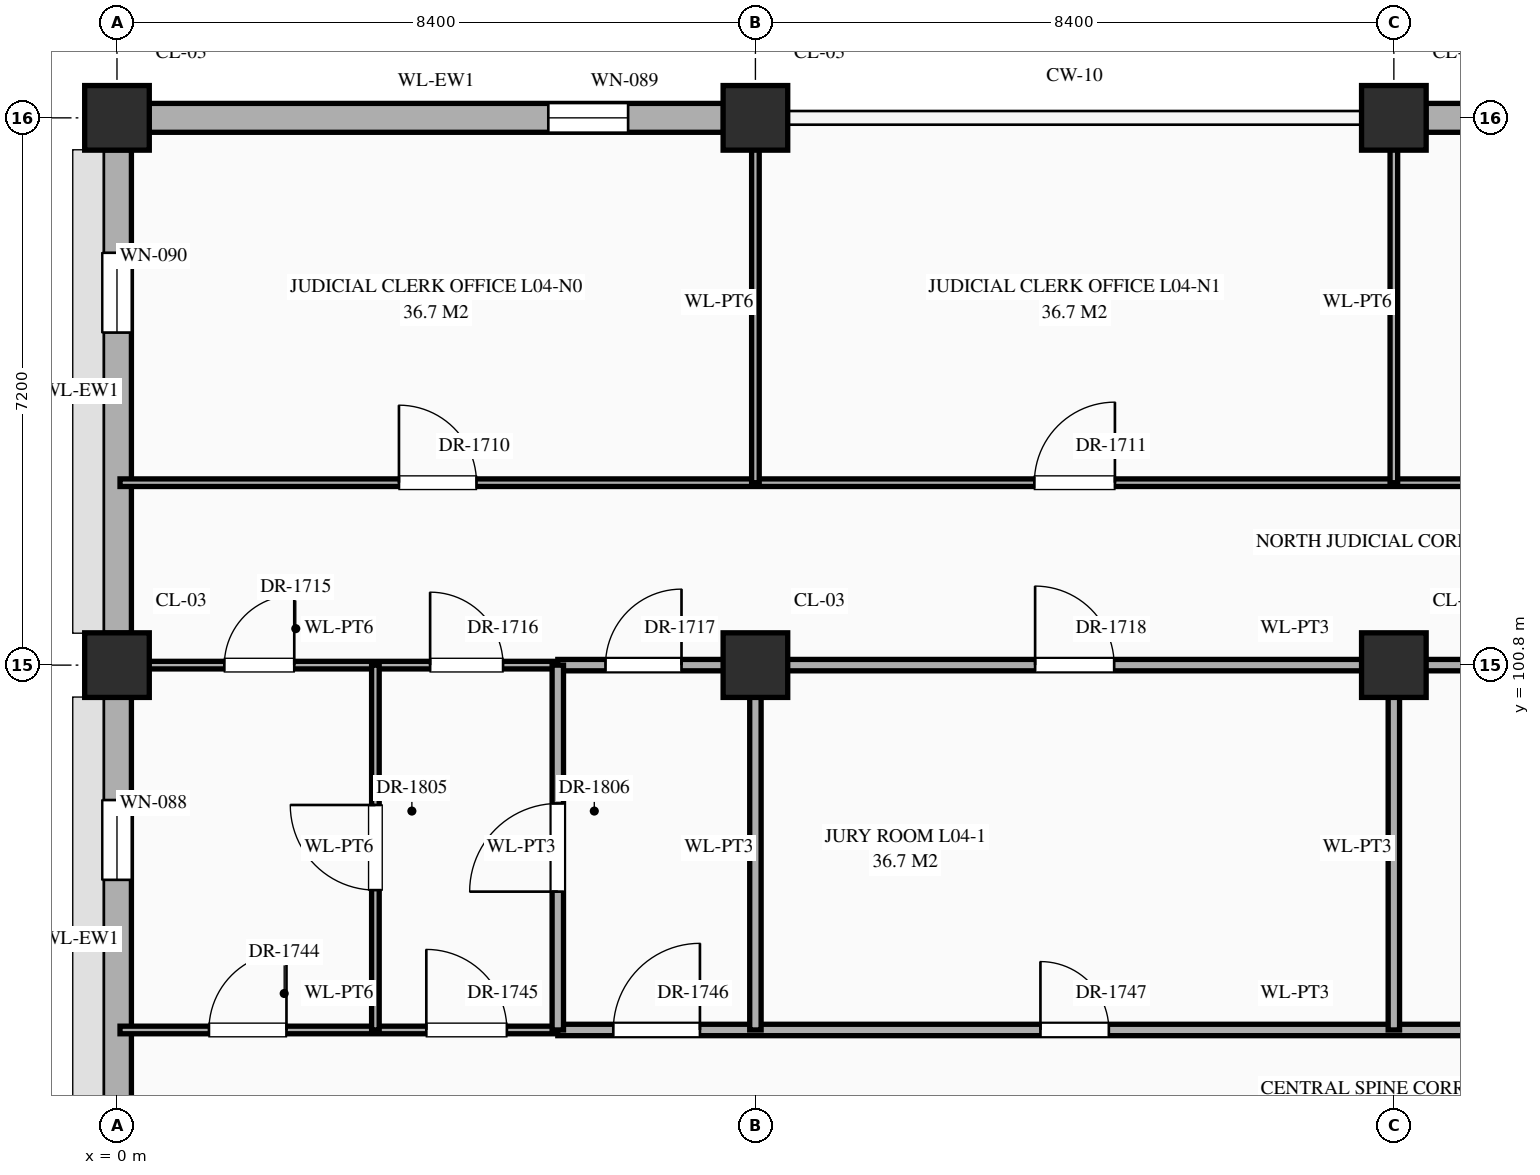
"""IFC4 building model, lengths in metres.
Left out: names, types, materials, properties, quantities, classifications, styles, units other than length and angle.
Written with IfcOpenShell. Run it as: python <this file> out.ifc"""

import sys

from ifc_helpers import new_model, si_unit, direction, frame, frame_2d, origin, origin_2d, place, context, subcontext, project, spatial, rectangle, extrude, element, fill, save


model = new_model("IFC4")
c1 = context("Model", 3, precision=1e-05, world=origin(), true_north=direction((0.0, 1.0)))
c2 = subcontext(c1, "Body", "Model", "MODEL_VIEW")
j1 = project(units=[si_unit("LENGTHUNIT", "METRE"), si_unit("PLANEANGLEUNIT", "RADIAN")], contexts=[c1])
p1 = place(None, origin())
s1 = spatial("IfcSite", under=j1, at=p1, CompositionType="ELEMENT")
p2 = place(p1, origin())
s2 = spatial("IfcBuilding", under=s1, at=p2, CompositionType="ELEMENT")
p3 = place(p2, frame((0.0, 0.0, 16.2)))
s3 = spatial("IfcBuildingStorey", under=s2, at=p3, CompositionType="ELEMENT", Elevation=16.2)
for number, where, z_axis, x_axis in (
    (1, (0.0, 100.8, 0.0), (0.0, 0.0, 1.0), (1.0, 0.0, 0.0)),
    (2, (0.0, 108.0, 0.0), (0.0, 0.0, 1.0), (1.0, 0.0, 0.0)),
    (3, (8.4, 100.8, 0.0), (0.0, 0.0, 1.0), (1.0, 0.0, 0.0)),
    (4, (8.4, 108.0, 0.0), (0.0, 0.0, 1.0), (1.0, 0.0, 0.0)),
    (5, (16.8, 100.8, 0.0), (0.0, 0.0, 1.0), (1.0, 0.0, 0.0)),
    (6, (16.8, 108.0, 0.0), (0.0, 0.0, 1.0), (1.0, 0.0, 0.0)),
):
    element("IfcColumn", number, at=place(p3, frame(where, z_axis=z_axis, x_axis=x_axis)), inside=s3, PredefinedType="COLUMN", context=c2, shape_type="SweptSolid", body=[
        extrude(rectangle(XDim=0.85, YDim=0.85, at=origin_2d()), origin(), (0.0, 0.0, 1.0), 5.4),
    ])
p4 = place(p3, frame((0.0, 94.02, 0.0), z_axis=(0.0, 0.0, 1.0), x_axis=(0.0, 1.0, 0.0)))
e7 = element("IfcWall", 7, at=p4, inside=s3, PredefinedType="STANDARD", context=c2, shape_type="SweptSolid", body=[
    extrude(rectangle(XDim=6.36, YDim=0.38, at=frame_2d((3.18, 0.0))), origin(), (0.0, 0.0, 1.0), 4.55),
])
p5 = place(p4, frame((3.955, 0.0, 0.85)))
e8 = element("IfcOpeningElement", 8, at=p5, cuts=e7, PredefinedType="OPENING", context=c2, shape_type="SweptSolid", body=[
    extrude(rectangle(XDim=1.05, YDim=1.38, at=frame_2d((0.525, 0.69))), frame((0.0, 0.202, 0.0), z_axis=(0.0, -1.0, 0.0), x_axis=(1.0, 0.0, 0.0)), (0.0, 0.0, 1.0), 0.404),
])
p6 = place(p3, frame((0.42, 108.0, 0.0), z_axis=(0.0, 0.0, 1.0), x_axis=(1.0, 0.0, 0.0)))
e9 = element("IfcWall", 9, at=p6, inside=s3, PredefinedType="STANDARD", context=c2, shape_type="SweptSolid", body=[
    extrude(rectangle(XDim=7.56, YDim=0.38, at=frame_2d((3.78, 0.0))), origin(), (0.0, 0.0, 1.0), 4.55),
])
p7 = place(p6, frame((5.255, 0.0, 0.85)))
e10 = element("IfcOpeningElement", 10, at=p7, cuts=e9, PredefinedType="OPENING", context=c2, shape_type="SweptSolid", body=[
    extrude(rectangle(XDim=1.05, YDim=1.56, at=frame_2d((0.525, 0.78))), frame((0.0, 0.202, 0.0), z_axis=(0.0, -1.0, 0.0), x_axis=(1.0, 0.0, 0.0)), (0.0, 0.0, 1.0), 0.404),
])
p8 = place(p3, frame((0.0, 101.22, 0.0), z_axis=(0.0, 0.0, 1.0), x_axis=(0.0, 1.0, 0.0)))
e11 = element("IfcWall", 11, at=p8, inside=s3, PredefinedType="STANDARD", context=c2, shape_type="SweptSolid", body=[
    extrude(rectangle(XDim=6.36, YDim=0.38, at=frame_2d((3.18, 0.0))), origin(), (0.0, 0.0, 1.0), 4.55),
])
p9 = place(p8, frame((3.955, 0.0, 0.85)))
e12 = element("IfcOpeningElement", 12, at=p9, cuts=e11, PredefinedType="OPENING", context=c2, shape_type="SweptSolid", body=[
    extrude(rectangle(XDim=1.05, YDim=1.56, at=frame_2d((0.525, 0.78))), frame((0.0, 0.202, 0.0), z_axis=(0.0, -1.0, 0.0), x_axis=(1.0, 0.0, 0.0)), (0.0, 0.0, 1.0), 0.404),
])
p10 = place(p3, frame((17.22, 108.0, 0.0), z_axis=(0.0, 0.0, 1.0), x_axis=(1.0, 0.0, 0.0)))
e13 = element("IfcWall", 13, at=p10, inside=s3, PredefinedType="STANDARD", context=c2, shape_type="SweptSolid", body=[
    extrude(rectangle(XDim=7.56, YDim=0.38, at=frame_2d((3.78, 0.0))), origin(), (0.0, 0.0, 1.0), 4.4),
])
p11 = place(p10, frame((5.255, 0.0, 0.85)))
e14 = element("IfcOpeningElement", 14, at=p11, cuts=e13, PredefinedType="OPENING", context=c2, shape_type="SweptSolid", body=[
    extrude(rectangle(XDim=1.05, YDim=1.92, at=frame_2d((0.525, 0.96))), frame((0.0, 0.202, 0.0), z_axis=(0.0, -1.0, 0.0), x_axis=(1.0, 0.0, 0.0)), (0.0, 0.0, 1.0), 0.404),
])
p12 = place(p3, frame((0.04, 96.0, 0.0), z_axis=(0.0, 0.0, 1.0), x_axis=(1.0, 0.0, 0.0)))
e15 = element("IfcWall", 15, at=p12, inside=s3, PredefinedType="STANDARD", context=c2, shape_type="SweptSolid", body=[
    extrude(rectangle(XDim=5.76, YDim=0.1, at=frame_2d((2.88, 0.0))), origin(), (0.0, 0.0, 1.0), 5.2),
])
p13 = place(p12, frame((1.17, 0.0, 0.0)))
e16 = element("IfcOpeningElement", 16, at=p13, cuts=e15, PredefinedType="OPENING", context=c2, shape_type="SweptSolid", body=[
    extrude(rectangle(XDim=1.02, YDim=2.4, at=frame_2d((0.51, 1.2))), frame((0.0, 0.062, 0.0), z_axis=(0.0, -1.0, 0.0), x_axis=(1.0, 0.0, 0.0)), (0.0, 0.0, 1.0), 0.124),
])
p14 = place(p12, frame((4.03, 0.0, 0.0)))
e17 = element("IfcOpeningElement", 17, at=p14, cuts=e15, PredefinedType="OPENING", context=c2, shape_type="SweptSolid", body=[
    extrude(rectangle(XDim=1.06, YDim=2.4, at=frame_2d((0.53, 1.2))), frame((0.0, 0.062, 0.0), z_axis=(0.0, -1.0, 0.0), x_axis=(1.0, 0.0, 0.0)), (0.0, 0.0, 1.0), 0.124),
])
p15 = place(p3, frame((5.8, 96.0, 0.0), z_axis=(0.0, 0.0, 1.0), x_axis=(1.0, 0.0, 0.0)))
e18 = element("IfcWall", 18, at=p15, inside=s3, PredefinedType="STANDARD", context=c2, shape_type="SweptSolid", body=[
    extrude(rectangle(XDim=19.4, YDim=0.15, at=frame_2d((9.7, 0.0))), origin(), (0.0, 0.0, 1.0), 5.2),
])
p16 = place(p15, frame((0.73, 0.0, 0.0)))
e19 = element("IfcOpeningElement", 19, at=p16, cuts=e18, PredefinedType="OPENING", context=c2, shape_type="SweptSolid", body=[
    extrude(rectangle(XDim=1.14, YDim=2.4, at=frame_2d((0.57, 1.2))), frame((0.0, 0.087, 0.0), z_axis=(0.0, -1.0, 0.0), x_axis=(1.0, 0.0, 0.0)), (0.0, 0.0, 1.0), 0.174),
])
p17 = place(p15, frame((6.35, 0.0, 0.0)))
e20 = element("IfcOpeningElement", 20, at=p17, cuts=e18, PredefinedType="OPENING", context=c2, shape_type="SweptSolid", body=[
    extrude(rectangle(XDim=0.9, YDim=2.15, at=frame_2d((0.45, 1.075))), frame((0.0, 0.087, 0.0), z_axis=(0.0, -1.0, 0.0), x_axis=(1.0, 0.0, 0.0)), (0.0, 0.0, 1.0), 0.174),
])
p18 = place(p15, frame((14.77, 0.0, 0.0)))
e21 = element("IfcOpeningElement", 21, at=p18, cuts=e18, PredefinedType="OPENING", context=c2, shape_type="SweptSolid", body=[
    extrude(rectangle(XDim=0.86, YDim=2.1, at=frame_2d((0.43, 1.05))), frame((0.0, 0.087, 0.0), z_axis=(0.0, -1.0, 0.0), x_axis=(1.0, 0.0, 0.0)), (0.0, 0.0, 1.0), 0.174),
])
p19 = place(p3, frame((0.04, 100.8, 0.0), z_axis=(0.0, 0.0, 1.0), x_axis=(1.0, 0.0, 0.0)))
e22 = element("IfcWall", 22, at=p19, inside=s3, PredefinedType="STANDARD", context=c2, shape_type="SweptSolid", body=[
    extrude(rectangle(XDim=5.76, YDim=0.1, at=frame_2d((2.88, 0.0))), origin(), (0.0, 0.0, 1.0), 4.35),
])
p20 = place(p19, frame((1.373, 0.0, 0.0)))
e23 = element("IfcOpeningElement", 23, at=p20, cuts=e22, PredefinedType="OPENING", context=c2, shape_type="SweptSolid", body=[
    extrude(rectangle(XDim=0.92, YDim=2.15, at=frame_2d((0.46, 1.075))), frame((0.0, 0.062, 0.0), z_axis=(0.0, -1.0, 0.0), x_axis=(1.0, 0.0, 0.0)), (0.0, 0.0, 1.0), 0.124),
])
p21 = place(p19, frame((4.08, 0.0, 0.0)))
e24 = element("IfcOpeningElement", 24, at=p21, cuts=e22, PredefinedType="OPENING", context=c2, shape_type="SweptSolid", body=[
    extrude(rectangle(XDim=0.96, YDim=2.2, at=frame_2d((0.48, 1.1))), frame((0.0, 0.062, 0.0), z_axis=(0.0, -1.0, 0.0), x_axis=(1.0, 0.0, 0.0)), (0.0, 0.0, 1.0), 0.124),
])
p22 = place(p3, frame((5.8, 100.8, 0.0), z_axis=(0.0, 0.0, 1.0), x_axis=(1.0, 0.0, 0.0)))
e25 = element("IfcWall", 25, at=p22, inside=s3, PredefinedType="STANDARD", context=c2, shape_type="SweptSolid", body=[
    extrude(rectangle(XDim=19.4, YDim=0.15, at=frame_2d((9.7, 0.0))), origin(), (0.0, 0.0, 1.0), 4.2),
])
p23 = place(p22, frame((0.627, 0.0, 0.0)))
e26 = element("IfcOpeningElement", 26, at=p23, cuts=e25, PredefinedType="OPENING", context=c2, shape_type="SweptSolid", body=[
    extrude(rectangle(XDim=1.0, YDim=2.25, at=frame_2d((0.5, 1.125))), frame((0.0, 0.087, 0.0), z_axis=(0.0, -1.0, 0.0), x_axis=(1.0, 0.0, 0.0)), (0.0, 0.0, 1.0), 0.174),
])
p24 = place(p22, frame((6.28, 0.0, 0.0)))
e27 = element("IfcOpeningElement", 27, at=p24, cuts=e25, PredefinedType="OPENING", context=c2, shape_type="SweptSolid", body=[
    extrude(rectangle(XDim=1.04, YDim=2.2, at=frame_2d((0.52, 1.1))), frame((0.0, 0.087, 0.0), z_axis=(0.0, -1.0, 0.0), x_axis=(1.0, 0.0, 0.0)), (0.0, 0.0, 1.0), 0.174),
])
p25 = place(p22, frame((14.66, 0.0, 0.0)))
e28 = element("IfcOpeningElement", 28, at=p25, cuts=e25, PredefinedType="OPENING", context=c2, shape_type="SweptSolid", body=[
    extrude(rectangle(XDim=1.08, YDim=2.25, at=frame_2d((0.54, 1.125))), frame((0.0, 0.087, 0.0), z_axis=(0.0, -1.0, 0.0), x_axis=(1.0, 0.0, 0.0)), (0.0, 0.0, 1.0), 0.174),
])
p26 = place(p3, frame((0.04, 103.2, 0.0), z_axis=(0.0, 0.0, 1.0), x_axis=(1.0, 0.0, 0.0)))
e29 = element("IfcWall", 29, at=p26, inside=s3, PredefinedType="STANDARD", context=c2, shape_type="SweptSolid", body=[
    extrude(rectangle(XDim=41.96, YDim=0.1, at=frame_2d((20.98, 0.0))), origin(), (0.0, 0.0, 1.0), 5.05),
])
p27 = place(p26, frame((3.67, 0.0, 0.0)))
e30 = element("IfcOpeningElement", 30, at=p27, cuts=e29, PredefinedType="OPENING", context=c2, shape_type="SweptSolid", body=[
    extrude(rectangle(XDim=1.02, YDim=2.4, at=frame_2d((0.51, 1.2))), frame((0.0, 0.062, 0.0), z_axis=(0.0, -1.0, 0.0), x_axis=(1.0, 0.0, 0.0)), (0.0, 0.0, 1.0), 0.124),
])
p28 = place(p26, frame((12.03, 0.0, 0.0)))
e31 = element("IfcOpeningElement", 31, at=p28, cuts=e29, PredefinedType="OPENING", context=c2, shape_type="SweptSolid", body=[
    extrude(rectangle(XDim=1.06, YDim=2.4, at=frame_2d((0.53, 1.2))), frame((0.0, 0.062, 0.0), z_axis=(0.0, -1.0, 0.0), x_axis=(1.0, 0.0, 0.0)), (0.0, 0.0, 1.0), 0.124),
])
p29 = place(p26, frame((20.39, 0.0, 0.0)))
e32 = element("IfcOpeningElement", 32, at=p29, cuts=e29, PredefinedType="OPENING", context=c2, shape_type="SweptSolid", body=[
    extrude(rectangle(XDim=1.14, YDim=2.4, at=frame_2d((0.57, 1.2))), frame((0.0, 0.062, 0.0), z_axis=(0.0, -1.0, 0.0), x_axis=(1.0, 0.0, 0.0)), (0.0, 0.0, 1.0), 0.124),
])
p30 = place(p26, frame((28.91, 0.0, 0.0)))
e33 = element("IfcOpeningElement", 33, at=p30, cuts=e29, PredefinedType="OPENING", context=c2, shape_type="SweptSolid", body=[
    extrude(rectangle(XDim=0.9, YDim=2.15, at=frame_2d((0.45, 1.075))), frame((0.0, 0.062, 0.0), z_axis=(0.0, -1.0, 0.0), x_axis=(1.0, 0.0, 0.0)), (0.0, 0.0, 1.0), 0.124),
])
p31 = place(p26, frame((37.33, 0.0, 0.0)))
e34 = element("IfcOpeningElement", 34, at=p31, cuts=e29, PredefinedType="OPENING", context=c2, shape_type="SweptSolid", body=[
    extrude(rectangle(XDim=0.86, YDim=2.1, at=frame_2d((0.43, 1.05))), frame((0.0, 0.062, 0.0), z_axis=(0.0, -1.0, 0.0), x_axis=(1.0, 0.0, 0.0)), (0.0, 0.0, 1.0), 0.124),
])
p32 = place(p3, frame((3.4, 96.0, 0.0), z_axis=(0.0, 0.0, 1.0), x_axis=(0.0, 1.0, 0.0)))
e35 = element("IfcWall", 35, at=p32, inside=s3, PredefinedType="STANDARD", context=c2, shape_type="SweptSolid", body=[
    extrude(rectangle(XDim=4.8, YDim=0.1, at=frame_2d((2.4, 0.0))), origin(), (0.0, 0.0, 1.0), 5.2),
])
p33 = place(p32, frame((1.84, 0.0, 0.0)))
e36 = element("IfcOpeningElement", 36, at=p33, cuts=e35, PredefinedType="OPENING", context=c2, shape_type="SweptSolid", body=[
    extrude(rectangle(XDim=1.12, YDim=2.25, at=frame_2d((0.56, 1.125))), frame((0.0, 0.062, 0.0), z_axis=(0.0, -1.0, 0.0), x_axis=(1.0, 0.0, 0.0)), (0.0, 0.0, 1.0), 0.124),
])
p34 = place(p3, frame((5.8, 96.0, 0.0), z_axis=(0.0, 0.0, 1.0), x_axis=(0.0, 1.0, 0.0)))
e37 = element("IfcWall", 37, at=p34, inside=s3, PredefinedType="STANDARD", context=c2, shape_type="SweptSolid", body=[
    extrude(rectangle(XDim=4.8, YDim=0.15, at=frame_2d((2.4, 0.0))), origin(), (0.0, 0.0, 1.0), 5.2),
])
p35 = place(p34, frame((1.82, 0.0, 0.0)))
e38 = element("IfcOpeningElement", 38, at=p35, cuts=e37, PredefinedType="OPENING", context=c2, shape_type="SweptSolid", body=[
    extrude(rectangle(XDim=1.16, YDim=2.3, at=frame_2d((0.58, 1.15))), frame((0.0, 0.087, 0.0), z_axis=(0.0, -1.0, 0.0), x_axis=(1.0, 0.0, 0.0)), (0.0, 0.0, 1.0), 0.174),
])
p36 = place(p3, frame((8.4, 96.0, 0.0), z_axis=(0.0, 0.0, 1.0), x_axis=(0.0, 1.0, 0.0)))
e39 = element("IfcWall", 39, at=p36, inside=s3, PredefinedType="STANDARD", context=c2, shape_type="SweptSolid", body=[
    extrude(rectangle(XDim=4.8, YDim=0.15, at=frame_2d((2.4, 0.0))), origin(), (0.0, 0.0, 1.0), 4.45),
])
p37 = place(p3, frame((8.4, 103.2, 0.0), z_axis=(0.0, 0.0, 1.0), x_axis=(0.0, 1.0, 0.0)))
e40 = element("IfcWall", 40, at=p37, inside=s3, PredefinedType="STANDARD", context=c2, shape_type="SweptSolid", body=[
    extrude(rectangle(XDim=4.76, YDim=0.1, at=frame_2d((2.38, 0.0))), origin(), (0.0, 0.0, 1.0), 4.45),
])
p38 = place(p3, frame((16.8, 96.0, 0.0), z_axis=(0.0, 0.0, 1.0), x_axis=(0.0, 1.0, 0.0)))
e41 = element("IfcWall", 41, at=p38, inside=s3, PredefinedType="STANDARD", context=c2, shape_type="SweptSolid", body=[
    extrude(rectangle(XDim=4.8, YDim=0.15, at=frame_2d((2.4, 0.0))), origin(), (0.0, 0.0, 1.0), 4.3),
])
p39 = place(p3, frame((16.8, 103.2, 0.0), z_axis=(0.0, 0.0, 1.0), x_axis=(0.0, 1.0, 0.0)))
e42 = element("IfcWall", 42, at=p39, inside=s3, PredefinedType="STANDARD", context=c2, shape_type="SweptSolid", body=[
    extrude(rectangle(XDim=4.76, YDim=0.1, at=frame_2d((2.38, 0.0))), origin(), (0.0, 0.0, 1.0), 4.3),
])
p40 = place(p5, origin())
e43 = element("IfcWindow", 43, at=p40, inside=s3, PartitioningType="SINGLE_PANEL", PredefinedType="WINDOW", context=c2, shape_type="SweptSolid", body=[
    extrude(rectangle(XDim=1.05, YDim=1.38, at=frame_2d((0.525, 0.69))), frame((0.0, 0.03, 0.0), z_axis=(0.0, -1.0, 0.0), x_axis=(1.0, 0.0, 0.0)), (0.0, 0.0, 1.0), 0.06),
])
fill(e8, e43)
p41 = place(p7, origin())
e44 = element("IfcWindow", 44, at=p41, inside=s3, PartitioningType="SINGLE_PANEL", PredefinedType="WINDOW", context=c2, shape_type="SweptSolid", body=[
    extrude(rectangle(XDim=1.05, YDim=1.56, at=frame_2d((0.525, 0.78))), frame((0.0, 0.03, 0.0), z_axis=(0.0, -1.0, 0.0), x_axis=(1.0, 0.0, 0.0)), (0.0, 0.0, 1.0), 0.06),
])
fill(e10, e44)
p42 = place(p9, origin())
e45 = element("IfcWindow", 45, at=p42, inside=s3, PartitioningType="SINGLE_PANEL", PredefinedType="WINDOW", context=c2, shape_type="SweptSolid", body=[
    extrude(rectangle(XDim=1.05, YDim=1.56, at=frame_2d((0.525, 0.78))), frame((0.0, 0.03, 0.0), z_axis=(0.0, -1.0, 0.0), x_axis=(1.0, 0.0, 0.0)), (0.0, 0.0, 1.0), 0.06),
])
fill(e12, e45)
p43 = place(p27, origin())
e46 = element("IfcDoor", 46, at=p43, inside=s3, OperationType="SINGLE_SWING_LEFT", PredefinedType="DOOR", context=c2, shape_type="SweptSolid", body=[
    extrude(rectangle(XDim=1.02, YDim=2.4, at=frame_2d((0.51, 1.2))), frame((0.0, 0.025, 0.0), z_axis=(0.0, -1.0, 0.0), x_axis=(1.0, 0.0, 0.0)), (0.0, 0.0, 1.0), 0.05),
])
fill(e30, e46)
p44 = place(p28, origin())
e47 = element("IfcDoor", 47, at=p44, inside=s3, OperationType="SINGLE_SWING_RIGHT", PredefinedType="DOOR", context=c2, shape_type="SweptSolid", body=[
    extrude(rectangle(XDim=1.06, YDim=2.4, at=frame_2d((0.53, 1.2))), frame((0.0, 0.025, 0.0), z_axis=(0.0, -1.0, 0.0), x_axis=(1.0, 0.0, 0.0)), (0.0, 0.0, 1.0), 0.05),
])
fill(e31, e47)
p45 = place(p20, origin())
e48 = element("IfcDoor", 48, at=p45, inside=s3, OperationType="SINGLE_SWING_RIGHT", PredefinedType="DOOR", context=c2, shape_type="SweptSolid", body=[
    extrude(rectangle(XDim=0.92, YDim=2.15, at=frame_2d((0.46, 1.075))), frame((0.0, 0.025, 0.0), z_axis=(0.0, -1.0, 0.0), x_axis=(1.0, 0.0, 0.0)), (0.0, 0.0, 1.0), 0.05),
])
fill(e23, e48)
p46 = place(p21, origin())
e49 = element("IfcDoor", 49, at=p46, inside=s3, OperationType="SINGLE_SWING_LEFT", PredefinedType="DOOR", context=c2, shape_type="SweptSolid", body=[
    extrude(rectangle(XDim=0.96, YDim=2.2, at=frame_2d((0.48, 1.1))), frame((0.0, 0.025, 0.0), z_axis=(0.0, -1.0, 0.0), x_axis=(1.0, 0.0, 0.0)), (0.0, 0.0, 1.0), 0.05),
])
fill(e24, e49)
p47 = place(p23, origin())
e50 = element("IfcDoor", 50, at=p47, inside=s3, OperationType="SINGLE_SWING_RIGHT", PredefinedType="DOOR", context=c2, shape_type="SweptSolid", body=[
    extrude(rectangle(XDim=1.0, YDim=2.25, at=frame_2d((0.5, 1.125))), frame((0.0, 0.025, 0.0), z_axis=(0.0, -1.0, 0.0), x_axis=(1.0, 0.0, 0.0)), (0.0, 0.0, 1.0), 0.05),
])
fill(e26, e50)
p48 = place(p24, origin())
e51 = element("IfcDoor", 51, at=p48, inside=s3, OperationType="SINGLE_SWING_LEFT", PredefinedType="DOOR", context=c2, shape_type="SweptSolid", body=[
    extrude(rectangle(XDim=1.04, YDim=2.2, at=frame_2d((0.52, 1.1))), frame((0.0, 0.025, 0.0), z_axis=(0.0, -1.0, 0.0), x_axis=(1.0, 0.0, 0.0)), (0.0, 0.0, 1.0), 0.05),
])
fill(e27, e51)
p49 = place(p13, origin())
e52 = element("IfcDoor", 52, at=p49, inside=s3, OperationType="SINGLE_SWING_RIGHT", PredefinedType="DOOR", context=c2, shape_type="SweptSolid", body=[
    extrude(rectangle(XDim=1.02, YDim=2.4, at=frame_2d((0.51, 1.2))), frame((0.0, 0.025, 0.0), z_axis=(0.0, -1.0, 0.0), x_axis=(1.0, 0.0, 0.0)), (0.0, 0.0, 1.0), 0.05),
])
fill(e16, e52)
p50 = place(p14, origin())
e53 = element("IfcDoor", 53, at=p50, inside=s3, OperationType="SINGLE_SWING_LEFT", PredefinedType="DOOR", context=c2, shape_type="SweptSolid", body=[
    extrude(rectangle(XDim=1.06, YDim=2.4, at=frame_2d((0.53, 1.2))), frame((0.0, 0.025, 0.0), z_axis=(0.0, -1.0, 0.0), x_axis=(1.0, 0.0, 0.0)), (0.0, 0.0, 1.0), 0.05),
])
fill(e17, e53)
p51 = place(p16, origin())
e54 = element("IfcDoor", 54, at=p51, inside=s3, OperationType="SINGLE_SWING_RIGHT", PredefinedType="DOOR", context=c2, shape_type="SweptSolid", body=[
    extrude(rectangle(XDim=1.14, YDim=2.4, at=frame_2d((0.57, 1.2))), frame((0.0, 0.025, 0.0), z_axis=(0.0, -1.0, 0.0), x_axis=(1.0, 0.0, 0.0)), (0.0, 0.0, 1.0), 0.05),
])
fill(e19, e54)
p52 = place(p17, origin())
e55 = element("IfcDoor", 55, at=p52, inside=s3, OperationType="SINGLE_SWING_LEFT", PredefinedType="DOOR", context=c2, shape_type="SweptSolid", body=[
    extrude(rectangle(XDim=0.9, YDim=2.15, at=frame_2d((0.45, 1.075))), frame((0.0, 0.025, 0.0), z_axis=(0.0, -1.0, 0.0), x_axis=(1.0, 0.0, 0.0)), (0.0, 0.0, 1.0), 0.05),
])
fill(e20, e55)
p53 = place(p33, origin())
e56 = element("IfcDoor", 56, at=p53, inside=s3, OperationType="SINGLE_SWING_RIGHT", PredefinedType="DOOR", context=c2, shape_type="SweptSolid", body=[
    extrude(rectangle(XDim=1.12, YDim=2.25, at=frame_2d((0.56, 1.125))), frame((0.0, 0.025, 0.0), z_axis=(0.0, -1.0, 0.0), x_axis=(1.0, 0.0, 0.0)), (0.0, 0.0, 1.0), 0.05),
])
fill(e36, e56)
p54 = place(p35, origin())
e57 = element("IfcDoor", 57, at=p54, inside=s3, OperationType="SINGLE_SWING_LEFT", PredefinedType="DOOR", context=c2, shape_type="SweptSolid", body=[
    extrude(rectangle(XDim=1.16, YDim=2.3, at=frame_2d((0.58, 1.15))), frame((0.0, 0.025, 0.0), z_axis=(0.0, -1.0, 0.0), x_axis=(1.0, 0.0, 0.0)), (0.0, 0.0, 1.0), 0.05),
])
fill(e38, e57)
save(model, sys.argv[1])
